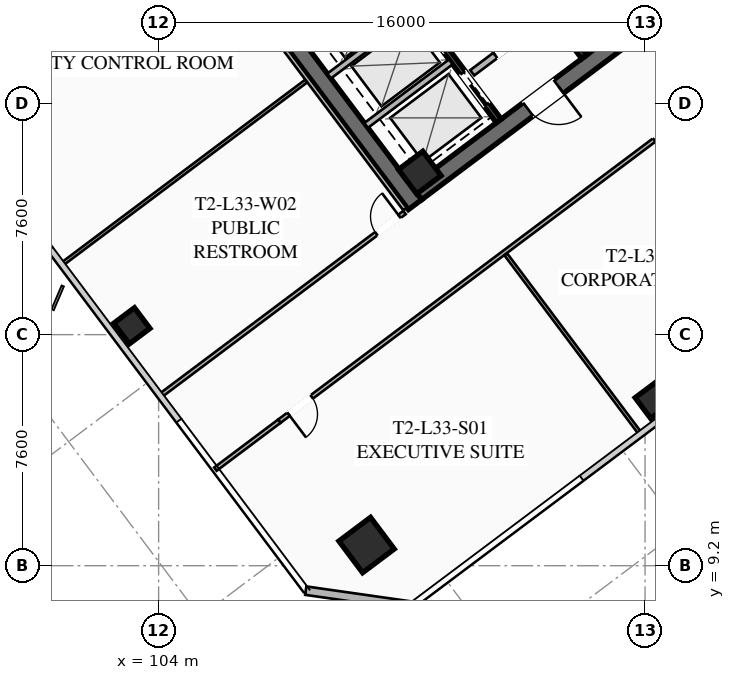
"""IFC4 building model, lengths in metres.
Left out: names, types, materials, properties, quantities, classifications, styles, units other than length and angle.
Written with IfcOpenShell. Run it as: python <this file> out.ifc"""

import sys

from ifc_helpers import new_model, si_unit, direction, frame, frame_2d, origin, origin_2d, place, context, subcontext, project, spatial, rectangle, hollow_rectangle, extrude, element, fill, save


model = new_model("IFC4")
c1 = context("Model", 3, precision=1e-05, world=origin(), true_north=direction((0.0, 1.0)))
c2 = subcontext(c1, "Body", "Model", "MODEL_VIEW")
j1 = project(units=[si_unit("LENGTHUNIT", "METRE"), si_unit("PLANEANGLEUNIT", "RADIAN")], contexts=[c1])
p1 = place(None, origin())
s1 = spatial("IfcSite", under=j1, at=p1, CompositionType="ELEMENT")
p2 = place(p1, origin())
s2 = spatial("IfcBuilding", under=s1, at=p2, CompositionType="ELEMENT")
p3 = place(p2, frame((0.0, 0.0, 125.05)))
s3 = spatial("IfcBuildingStorey", under=s2, at=p3, CompositionType="ELEMENT", Elevation=125.05)
p4 = place(p3, frame((112.436, 21.077, 0.0), z_axis=(0.0, 0.0, 1.0), x_axis=(-0.600005007985, 0.799996243986, 0.0)))
e1 = element("IfcWall", 1, at=p4, inside=s3, PredefinedType="SHEAR", context=c2, shape_type="SweptSolid", body=[
    extrude(rectangle(XDim=15.6, YDim=0.55, at=frame_2d((7.8, 0.0))), origin(), (0.0, 0.0, 1.0), 3.55),
])
p5 = place(p3, frame((124.539, 30.498, 0.0), z_axis=(0.0, 0.0, 1.0), x_axis=(-0.799998054672, -0.600002593761, 0.0)))
e2 = element("IfcWall", 2, at=p5, inside=s3, PredefinedType="SHEAR", context=c2, shape_type="SweptSolid", body=[
    extrude(rectangle(XDim=15.06, YDim=0.55, at=frame_2d((7.53, 0.0))), origin(), (0.0, 0.0, 1.0), 3.55),
])
p6 = place(p5, frame((9.23, 0.0, 0.0)))
e3 = element("IfcOpeningElement", 3, at=p6, cuts=e2, PredefinedType="OPENING", context=c2, shape_type="SweptSolid", body=[
    extrude(rectangle(XDim=1.25, YDim=2.25, at=frame_2d((0.625, 1.125))), frame((0.0, 0.285, 0.0), z_axis=(0.0, -1.0, 0.0), x_axis=(1.0, 0.0, 0.0)), (0.0, 0.0, 1.0), 0.57),
])
p7 = place(p5, frame((4.18, 0.0, 0.0)))
e4 = element("IfcOpeningElement", 4, at=p7, cuts=e2, PredefinedType="OPENING", context=c2, shape_type="SweptSolid", body=[
    extrude(rectangle(XDim=1.25, YDim=2.25, at=frame_2d((0.625, 1.125))), frame((0.0, 0.285, 0.0), z_axis=(0.0, -1.0, 0.0), x_axis=(1.0, 0.0, 0.0)), (0.0, 0.0, 1.0), 0.57),
])
p8 = place(p3, frame((112.59, 22.13, 0.0), z_axis=(0.0, 0.0, 1.0), x_axis=(0.799999996291, 0.600000004945, 0.0)))
e5 = element("IfcColumn", 5, at=p8, inside=s3, PredefinedType="COLUMN", context=c2, shape_type="SweptSolid", body=[
    extrude(hollow_rectangle(XDim=1.0, YDim=1.0, WallThickness=0.04, at=origin_2d()), origin(), (0.0, 0.0, 1.0), 3.37),
])
p9 = place(p3, frame((110.84, 9.88, 0.0), z_axis=(0.0, 0.0, 1.0), x_axis=(0.799999996291, 0.600000004945, 0.0)))
e6 = element("IfcColumn", 6, at=p9, inside=s3, PredefinedType="COLUMN", context=c2, shape_type="SweptSolid", body=[
    extrude(hollow_rectangle(XDim=1.3, YDim=1.3, WallThickness=0.05, at=origin_2d()), origin(), (0.0, 0.0, 1.0), 3.37),
])
for number, where, z_axis, x_axis in (
    (7, (120.27, 14.64, 0.0), (0.0, 0.0, 1.0), (0.8, 0.6, 0.0)),
    (8, (103.12, 17.09, 0.0), (0.0, 0.0, 1.0), (0.8, 0.6, 0.0)),
):
    element("IfcColumn", number, at=place(p3, frame(where, z_axis=z_axis, x_axis=x_axis)), inside=s3, PredefinedType="COLUMN", context=c2, shape_type="SweptSolid", body=[
        extrude(hollow_rectangle(XDim=0.85, YDim=0.85, WallThickness=0.035, at=origin_2d()), origin(), (0.0, 0.0, 1.0), 3.37),
    ])
p10 = place(p3, frame((112.34, 7.88, 0.0), z_axis=(0.0, 0.0, 1.0), x_axis=(-0.989949493661, 0.141421356237, 0.0)))
e9 = element("IfcWall", 9, at=p10, inside=s3, PredefinedType="SOLIDWALL", context=c2, shape_type="SweptSolid", body=[
    extrude(rectangle(XDim=3.536, YDim=0.28, at=frame_2d((1.768, 0.0))), origin(), (0.0, 0.0, 1.0), 3.37),
])
p11 = place(p3, frame((117.998, 25.936, 0.0), z_axis=(0.0, 0.0, 1.0), x_axis=(-0.600002693989, 0.799997979501, 0.0)))
e10 = element("IfcWall", 10, at=p11, inside=s3, PredefinedType="SHEAR", context=c2, shape_type="SweptSolid", body=[
    extrude(rectangle(XDim=14.5, YDim=0.2, at=frame_2d((7.25, 0.0))), origin(), (0.0, 0.0, 1.0), 3.37),
])
p12 = place(p3, frame((114.316, 25.412, 0.0), z_axis=(0.0, 0.0, 1.0), x_axis=(0.800018601094, 0.59997519774, 0.0)))
e11 = element("IfcWall", 11, at=p12, inside=s3, PredefinedType="SOLIDWALL", context=c2, shape_type="SweptSolid", body=[
    extrude(rectangle(XDim=3.15, YDim=0.22, at=frame_2d((1.575, 0.0))), origin(), (0.0, 0.0, 1.0), 2.723),
])
p13 = place(p12, frame((0.95, 0.0, 0.0)))
e12 = element("IfcOpeningElement", 12, at=p13, cuts=e11, PredefinedType="OPENING", context=c2, shape_type="SweptSolid", body=[
    extrude(rectangle(XDim=1.25, YDim=2.25, at=frame_2d((0.625, 1.125))), frame((0.0, 0.12, 0.0), z_axis=(0.0, -1.0, 0.0), x_axis=(1.0, 0.0, 0.0)), (0.0, 0.0, 1.0), 0.24),
])
p14 = place(p3, frame((115.19, 23.83, 0.0), z_axis=(0.0, 0.0, 1.0), x_axis=(-0.599993943644, 0.800004542231, 0.0)))
e13 = element("IfcWall", 13, at=p14, inside=s3, PredefinedType="SHEAR", context=c2, shape_type="SweptSolid", body=[
    extrude(rectangle(XDim=6.45, YDim=0.2, at=frame_2d((3.225, 0.0))), origin(), (0.0, 0.0, 1.0), 3.37),
])
p15 = place(p14, frame((4.875, 0.0, 0.0)))
e14 = element("IfcOpeningElement", 14, at=p15, cuts=e13, PredefinedType="OPENING", context=c2, shape_type="SweptSolid", body=[
    extrude(rectangle(XDim=1.3, YDim=2.25, at=frame_2d((0.65, 1.125))), frame((0.0, 0.11, 0.0), z_axis=(0.0, -1.0, 0.0), x_axis=(1.0, 0.0, 0.0)), (0.0, 0.0, 1.0), 0.22),
])
p16 = place(p14, frame((2.875, 0.0, 0.0)))
e15 = element("IfcOpeningElement", 15, at=p16, cuts=e13, PredefinedType="OPENING", context=c2, shape_type="SweptSolid", body=[
    extrude(rectangle(XDim=1.3, YDim=2.25, at=frame_2d((0.65, 1.125))), frame((0.0, 0.11, 0.0), z_axis=(0.0, -1.0, 0.0), x_axis=(1.0, 0.0, 0.0)), (0.0, 0.0, 1.0), 0.22),
])
p17 = place(p14, frame((0.675, 0.0, 0.0)))
e16 = element("IfcOpeningElement", 16, at=p17, cuts=e13, PredefinedType="OPENING", context=c2, shape_type="SweptSolid", body=[
    extrude(rectangle(XDim=1.3, YDim=2.25, at=frame_2d((0.65, 1.125))), frame((0.0, 0.11, 0.0), z_axis=(0.0, -1.0, 0.0), x_axis=(1.0, 0.0, 0.0)), (0.0, 0.0, 1.0), 0.22),
])
for number, where, z_axis, x_axis in (
    (17, (110.826, 23.682, 0.0), (0.0, 0.0, 1.0), (0.8, 0.6, 0.0)),
    (18, (109.608, 25.306, 0.0), (0.0, 0.0, 1.0), (0.8, 0.6, 0.0)),
):
    element("IfcWall", number, at=place(p3, frame(where, z_axis=z_axis, x_axis=x_axis)), inside=s3, PredefinedType="SOLIDWALL", context=c2, shape_type="SweptSolid", body=[
        extrude(rectangle(XDim=3.48, YDim=0.2, at=frame_2d((1.74, 0.0))), origin(), (0.0, 0.0, 1.0), 3.37),
    ])
p18 = place(p3, frame((133.012, 32.734, 0.0), z_axis=(0.0, 0.0, 1.0), x_axis=(-0.800003744006, -0.59999500796, 0.0)))
e19 = element("IfcWall", 19, at=p18, inside=s3, PredefinedType="PARTITIONING", context=c2, shape_type="SweptSolid", body=[
    extrude(rectangle(XDim=31.3, YDim=0.135, at=frame_2d((15.65, 0.0))), origin(), (0.0, 0.0, 1.0), 2.723),
])
p19 = place(p18, frame((29.97, 0.0, 0.0)))
e20 = element("IfcOpeningElement", 20, at=p19, cuts=e19, PredefinedType="OPENING", context=c2, shape_type="SweptSolid", body=[
    extrude(rectangle(XDim=0.95, YDim=2.05, at=frame_2d((0.475, 1.025))), frame((0.0, 0.077, 0.0), z_axis=(0.0, -1.0, 0.0), x_axis=(1.0, 0.0, 0.0)), (0.0, 0.0, 1.0), 0.155),
])
p20 = place(p18, frame((14.938, 0.0, 0.0)))
e21 = element("IfcOpeningElement", 21, at=p20, cuts=e19, PredefinedType="OPENING", context=c2, shape_type="SweptSolid", body=[
    extrude(rectangle(XDim=0.95, YDim=2.05, at=frame_2d((0.475, 1.025))), frame((0.0, 0.077, 0.0), z_axis=(0.0, -1.0, 0.0), x_axis=(1.0, 0.0, 0.0)), (0.0, 0.0, 1.0), 0.155),
])
p21 = place(p18, frame((0.38, 0.0, 0.0)))
e22 = element("IfcOpeningElement", 22, at=p21, cuts=e19, PredefinedType="OPENING", context=c2, shape_type="SweptSolid", body=[
    extrude(rectangle(XDim=0.95, YDim=2.05, at=frame_2d((0.475, 1.025))), frame((0.0, 0.077, 0.0), z_axis=(0.0, -1.0, 0.0), x_axis=(1.0, 0.0, 0.0)), (0.0, 0.0, 1.0), 0.155),
])
p22 = place(p3, frame((105.868, 12.376, 0.0), z_axis=(0.0, 0.0, 1.0), x_axis=(0.799977721118, 0.600029704027, 0.0)))
e23 = element("IfcWall", 23, at=p22, inside=s3, PredefinedType="PARTITIONING", context=c2, shape_type="SweptSolid", body=[
    extrude(rectangle(XDim=2.63, YDim=0.135, at=frame_2d((1.315, 0.0))), origin(), (0.0, 0.0, 1.0), 2.723),
])
p23 = place(p3, frame((119.848, 13.536, 0.0), z_axis=(0.0, 0.0, 1.0), x_axis=(-0.599994706986, 0.800003969733, 0.0)))
e24 = element("IfcWall", 24, at=p23, inside=s3, PredefinedType="PARTITIONING", context=c2, shape_type="SweptSolid", body=[
    extrude(rectangle(XDim=7.38, YDim=0.11, at=frame_2d((3.69, 0.0))), origin(), (0.0, 0.0, 1.0), 2.723),
])
p24 = place(p3, frame((112.104, 20.928, 0.0), z_axis=(0.0, 0.0, 1.0), x_axis=(-0.599994940075, 0.800003794918, 0.0)))
e25 = element("IfcWall", 25, at=p24, inside=s3, PredefinedType="PARTITIONING", context=c2, shape_type="SweptSolid", body=[
    extrude(rectangle(XDim=15.44, YDim=0.135, at=frame_2d((7.72, 0.0))), origin(), (0.0, 0.0, 1.0), 2.723),
])
p25 = place(p3, frame((104.056, 14.792, 0.0), z_axis=(0.0, 0.0, 1.0), x_axis=(0.800002918023, 0.599996109283, 0.0)))
e26 = element("IfcWall", 26, at=p25, inside=s3, PredefinedType="PARTITIONING", context=c2, shape_type="SweptSolid", body=[
    extrude(rectangle(XDim=10.04, YDim=0.135, at=frame_2d((5.02, 0.0))), origin(), (0.0, 0.0, 1.0), 2.723),
])
p26 = place(p25, frame((8.88, 0.0, 0.0)))
e27 = element("IfcOpeningElement", 27, at=p26, cuts=e26, PredefinedType="OPENING", context=c2, shape_type="SweptSolid", body=[
    extrude(rectangle(XDim=0.95, YDim=2.05, at=frame_2d((0.475, 1.025))), frame((0.0, 0.077, 0.0), z_axis=(0.0, -1.0, 0.0), x_axis=(1.0, 0.0, 0.0)), (0.0, 0.0, 1.0), 0.155),
])
p27 = place(p3, frame((100.816, 19.112, 0.0), z_axis=(0.0, 0.0, 1.0), x_axis=(0.800002918023, 0.599996109283, 0.0)))
e28 = element("IfcWall", 28, at=p27, inside=s3, PredefinedType="PARTITIONING", context=c2, shape_type="SweptSolid", body=[
    extrude(rectangle(XDim=10.04, YDim=0.11, at=frame_2d((5.02, 0.0))), origin(), (0.0, 0.0, 1.0), 2.723),
])
p28 = place(p6, origin())
e29 = element("IfcDoor", 29, at=p28, inside=s3, OperationType="SINGLE_SWING_LEFT", PredefinedType="DOOR", context=c2, shape_type="SweptSolid", body=[
    extrude(rectangle(XDim=1.25, YDim=2.25, at=frame_2d((0.625, 1.125))), frame((0.0, 0.025, 0.0), z_axis=(0.0, -1.0, 0.0), x_axis=(1.0, 0.0, 0.0)), (0.0, 0.0, 1.0), 0.05),
])
fill(e3, e29)
p29 = place(p13, origin())
e30 = element("IfcDoor", 30, at=p29, inside=s3, OperationType="SINGLE_SWING_LEFT", PredefinedType="DOOR", context=c2, shape_type="SweptSolid", body=[
    extrude(rectangle(XDim=1.25, YDim=2.25, at=frame_2d((0.625, 1.125))), frame((0.0, 0.025, 0.0), z_axis=(0.0, -1.0, 0.0), x_axis=(1.0, 0.0, 0.0)), (0.0, 0.0, 1.0), 0.05),
])
fill(e12, e30)
p30 = place(p19, origin())
e31 = element("IfcDoor", 31, at=p30, inside=s3, OperationType="SINGLE_SWING_RIGHT", PredefinedType="DOOR", context=c2, shape_type="SweptSolid", body=[
    extrude(rectangle(XDim=0.95, YDim=2.05, at=frame_2d((0.475, 1.025))), frame((0.0, 0.025, 0.0), z_axis=(0.0, -1.0, 0.0), x_axis=(1.0, 0.0, 0.0)), (0.0, 0.0, 1.0), 0.05),
])
fill(e20, e31)
p31 = place(p20, origin())
e32 = element("IfcDoor", 32, at=p31, inside=s3, OperationType="SINGLE_SWING_LEFT", PredefinedType="DOOR", context=c2, shape_type="SweptSolid", body=[
    extrude(rectangle(XDim=0.95, YDim=2.05, at=frame_2d((0.475, 1.025))), frame((0.0, 0.025, 0.0), z_axis=(0.0, -1.0, 0.0), x_axis=(1.0, 0.0, 0.0)), (0.0, 0.0, 1.0), 0.05),
])
fill(e21, e32)
p32 = place(p26, origin())
e33 = element("IfcDoor", 33, at=p32, inside=s3, OperationType="SINGLE_SWING_RIGHT", PredefinedType="DOOR", context=c2, shape_type="SweptSolid", body=[
    extrude(rectangle(XDim=0.95, YDim=2.05, at=frame_2d((0.475, 1.025))), frame((0.0, 0.025, 0.0), z_axis=(0.0, -1.0, 0.0), x_axis=(1.0, 0.0, 0.0)), (0.0, 0.0, 1.0), 0.05),
])
fill(e27, e33)
p33 = place(p17, origin())
e34 = element("IfcDoor", 34, at=p33, inside=s3, OperationType="SLIDING_TO_LEFT", PredefinedType="DOOR", context=c2, shape_type="SweptSolid", body=[
    extrude(rectangle(XDim=1.3, YDim=2.25, at=frame_2d((0.65, 1.125))), frame((0.0, 0.025, 0.0), z_axis=(0.0, -1.0, 0.0), x_axis=(1.0, 0.0, 0.0)), (0.0, 0.0, 1.0), 0.05),
])
fill(e16, e34)
save(model, sys.argv[1])
